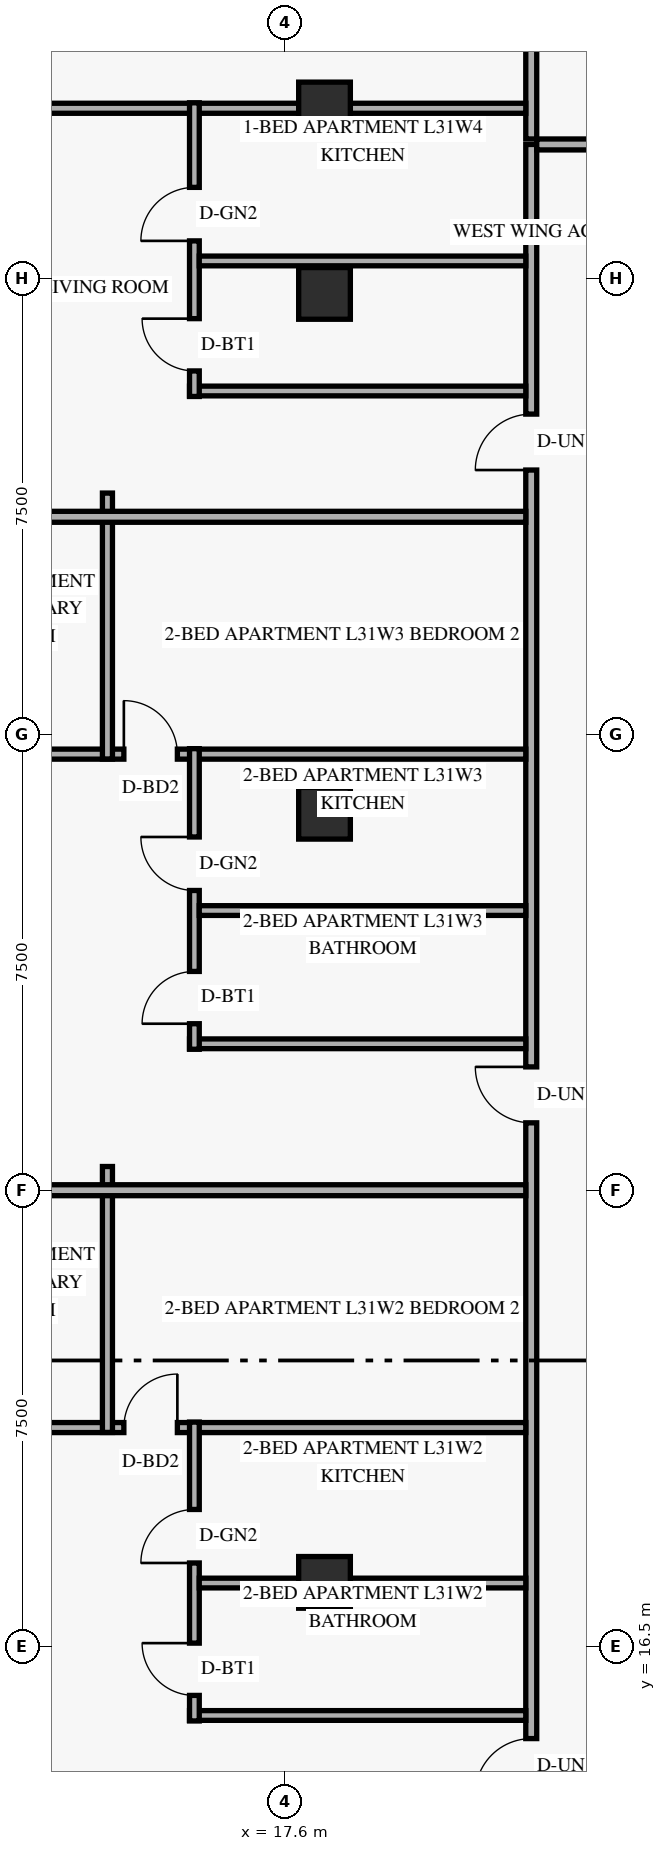
"""IFC4 building model, lengths in metres.
Left out: names, types, materials, properties, quantities, classifications, styles, units other than length and angle.
Written with IfcOpenShell. Run it as: python <this file> out.ifc"""

import sys

from ifc_helpers import new_model, si_unit, direction, frame, frame_2d, origin, origin_2d, place, context, subcontext, project, spatial, rectangle, extrude, element, fill, save


model = new_model("IFC4")
c1 = context("Model", 3, precision=1e-05, world=origin(), true_north=direction((0.0, 1.0)))
c2 = subcontext(c1, "Body", "Model", "MODEL_VIEW")
j1 = project(units=[si_unit("LENGTHUNIT", "METRE"), si_unit("PLANEANGLEUNIT", "RADIAN")], contexts=[c1])
p1 = place(None, origin())
s1 = spatial("IfcSite", under=j1, at=p1, CompositionType="ELEMENT")
p2 = place(p1, origin())
s2 = spatial("IfcBuilding", under=s1, at=p2, CompositionType="ELEMENT")
p3 = place(p2, frame((0.0, 0.0, 121.2)))
s3 = spatial("IfcBuildingStorey", under=s2, at=p3, CompositionType="ELEMENT", Elevation=121.2)
for number, where, z_axis, x_axis in (
    (1, (18.25, 17.55, 0.0), (0.0, 0.0, 1.0), (1.0, 0.0, 0.0)),
    (2, (18.25, 30.2, 0.0), (0.0, 0.0, 1.0), (1.0, 0.0, 0.0)),
    (3, (18.25, 38.75, 0.0), (0.0, 0.0, 1.0), (1.0, 0.0, 0.0)),
    (4, (18.25, 41.8, 0.0), (0.0, 0.0, 1.0), (1.0, 0.0, 0.0)),
):
    element("IfcColumn", number, at=place(p3, frame(where, z_axis=z_axis, x_axis=x_axis)), inside=s3, PredefinedType="COLUMN", context=c2, shape_type="SweptSolid", body=[
        extrude(rectangle(XDim=0.85, YDim=0.85, at=origin_2d()), origin(), (0.0, 0.0, 1.0), 3.6),
    ])
p4 = place(p3, frame((21.65, 6.8, 0.0), z_axis=(0.0, 0.0, 1.0), x_axis=(0.0, 1.0, 0.0)))
e5 = element("IfcWall", 5, at=p4, inside=s3, PredefinedType="STANDARD", context=c2, shape_type="SweptSolid", body=[
    extrude(rectangle(XDim=34.4, YDim=0.18, at=frame_2d((17.2, 0.0))), origin(), (0.0, 0.0, 1.0), 2.731),
])
p5 = place(p4, frame((4.472, 0.0, 0.0)))
e6 = element("IfcOpeningElement", 6, at=p5, cuts=e5, PredefinedType="OPENING", context=c2, shape_type="SweptSolid", body=[
    extrude(rectangle(XDim=0.92, YDim=2.15, at=frame_2d((0.46, 1.075))), frame((0.0, 0.1, 0.0), z_axis=(0.0, -1.0, 0.0), x_axis=(1.0, 0.0, 0.0)), (0.0, 0.0, 1.0), 0.2),
])
p6 = place(p4, frame((7.261, 0.0, 0.0)))
e7 = element("IfcOpeningElement", 7, at=p6, cuts=e5, PredefinedType="OPENING", context=c2, shape_type="SweptSolid", body=[
    extrude(rectangle(XDim=0.92, YDim=2.15, at=frame_2d((0.46, 1.075))), frame((0.0, 0.1, 0.0), z_axis=(0.0, -1.0, 0.0), x_axis=(1.0, 0.0, 0.0)), (0.0, 0.0, 1.0), 0.2),
])
p7 = place(p4, frame((18.308, 0.0, 0.0)))
e8 = element("IfcOpeningElement", 8, at=p7, cuts=e5, PredefinedType="OPENING", context=c2, shape_type="SweptSolid", body=[
    extrude(rectangle(XDim=0.92, YDim=2.15, at=frame_2d((0.46, 1.075))), frame((0.0, 0.1, 0.0), z_axis=(0.0, -1.0, 0.0), x_axis=(1.0, 0.0, 0.0)), (0.0, 0.0, 1.0), 0.2),
])
p8 = place(p4, frame((29.045, 0.0, 0.0)))
e9 = element("IfcOpeningElement", 9, at=p8, cuts=e5, PredefinedType="OPENING", context=c2, shape_type="SweptSolid", body=[
    extrude(rectangle(XDim=0.92, YDim=2.15, at=frame_2d((0.46, 1.075))), frame((0.0, 0.1, 0.0), z_axis=(0.0, -1.0, 0.0), x_axis=(1.0, 0.0, 0.0)), (0.0, 0.0, 1.0), 0.2),
])
p9 = place(p3, frame((21.74, 41.2, 0.0), z_axis=(0.0, 0.0, 1.0), x_axis=(1.0, 0.0, 0.0)))
e10 = element("IfcWall", 10, at=p9, inside=s3, PredefinedType="STANDARD", context=c2, shape_type="SweptSolid", body=[
    extrude(rectangle(XDim=13.68, YDim=0.18, at=frame_2d((6.84, 0.0))), origin(), (0.0, 0.0, 1.0), 2.731),
])
p10 = place(p9, frame((3.09, 0.0, 0.0)))
e11 = element("IfcOpeningElement", 11, at=p10, cuts=e10, PredefinedType="OPENING", context=c2, shape_type="SweptSolid", body=[
    extrude(rectangle(XDim=0.95, YDim=2.15, at=frame_2d((0.475, 1.075))), frame((0.0, 0.1, 0.0), z_axis=(0.0, -1.0, 0.0), x_axis=(1.0, 0.0, 0.0)), (0.0, 0.0, 1.0), 0.2),
])
p11 = place(p9, frame((10.11, 0.0, 0.0)))
e12 = element("IfcOpeningElement", 12, at=p11, cuts=e10, PredefinedType="OPENING", context=c2, shape_type="SweptSolid", body=[
    extrude(rectangle(XDim=0.95, YDim=2.15, at=frame_2d((0.475, 1.075))), frame((0.0, 0.1, 0.0), z_axis=(0.0, -1.0, 0.0), x_axis=(1.0, 0.0, 0.0)), (0.0, 0.0, 1.0), 0.2),
])
p12 = place(p3, frame((21.65, 41.29, 0.0), z_axis=(0.0, 0.0, 1.0), x_axis=(0.0, 1.0, 0.0)))
e13 = element("IfcWall", 13, at=p12, inside=s3, PredefinedType="PARTITIONING", context=c2, shape_type="SweptSolid", body=[
    extrude(rectangle(XDim=3.73, YDim=0.18, at=frame_2d((1.865, 0.0))), origin(), (0.0, 0.0, 1.0), 2.809),
])
p13 = place(p3, frame((10.08, 20.096, 0.0), z_axis=(0.0, 0.0, 1.0), x_axis=(1.0, 0.0, 0.0)))
e14 = element("IfcWall", 14, at=p13, inside=s3, PredefinedType="PARTITIONING", context=c2, shape_type="SweptSolid", body=[
    extrude(rectangle(XDim=11.48, YDim=0.165, at=frame_2d((5.74, 0.0))), origin(), (0.0, 0.0, 1.0), 2.731),
])
p14 = place(p13, frame((1.75, 0.0, 0.0)))
e15 = element("IfcOpeningElement", 15, at=p14, cuts=e14, PredefinedType="OPENING", context=c2, shape_type="SweptSolid", body=[
    extrude(rectangle(XDim=0.88, YDim=2.14, at=frame_2d((0.44, 1.07))), frame((0.0, 0.093, 0.0), z_axis=(0.0, -1.0, 0.0), x_axis=(1.0, 0.0, 0.0)), (0.0, 0.0, 1.0), 0.185),
])
p15 = place(p13, frame((4.87, 0.0, 0.0)))
e16 = element("IfcOpeningElement", 16, at=p15, cuts=e14, PredefinedType="OPENING", context=c2, shape_type="SweptSolid", body=[
    extrude(rectangle(XDim=0.88, YDim=2.14, at=frame_2d((0.44, 1.07))), frame((0.0, 0.093, 0.0), z_axis=(0.0, -1.0, 0.0), x_axis=(1.0, 0.0, 0.0)), (0.0, 0.0, 1.0), 0.185),
])
p16 = place(p3, frame((16.03, 15.361, 0.0), z_axis=(0.0, 0.0, 1.0), x_axis=(1.0, 0.0, 0.0)))
e17 = element("IfcWall", 17, at=p16, inside=s3, PredefinedType="PLUMBINGWALL", context=c2, shape_type="SweptSolid", body=[
    extrude(rectangle(XDim=5.53, YDim=0.16, at=frame_2d((2.765, 0.0))), origin(), (0.0, 0.0, 1.0), 2.731),
])
p17 = place(p3, frame((16.11, 15.271, 0.0), z_axis=(0.0, 0.0, 1.0), x_axis=(0.0, 1.0, 0.0)))
e18 = element("IfcWall", 18, at=p17, inside=s3, PredefinedType="PLUMBINGWALL", context=c2, shape_type="SweptSolid", body=[
    extrude(rectangle(XDim=4.915, YDim=0.16, at=frame_2d((2.458, 0.0))), origin(), (0.0, 0.0, 1.0), 2.731),
])
p18 = place(p17, frame((0.42, 0.0, 0.0)))
e19 = element("IfcOpeningElement", 19, at=p18, cuts=e18, PredefinedType="OPENING", context=c2, shape_type="SweptSolid", body=[
    extrude(rectangle(XDim=0.86, YDim=2.12, at=frame_2d((0.43, 1.06))), frame((0.0, 0.09, 0.0), z_axis=(0.0, -1.0, 0.0), x_axis=(1.0, 0.0, 0.0)), (0.0, 0.0, 1.0), 0.18),
])
p19 = place(p17, frame((2.598, 0.0, 0.0)))
e20 = element("IfcOpeningElement", 20, at=p19, cuts=e18, PredefinedType="OPENING", context=c2, shape_type="SweptSolid", body=[
    extrude(rectangle(XDim=0.88, YDim=2.12, at=frame_2d((0.44, 1.06))), frame((0.0, 0.09, 0.0), z_axis=(0.0, -1.0, 0.0), x_axis=(1.0, 0.0, 0.0)), (0.0, 0.0, 1.0), 0.18),
])
p20 = place(p3, frame((16.19, 17.539, 0.0), z_axis=(0.0, 0.0, 1.0), x_axis=(1.0, 0.0, 0.0)))
e21 = element("IfcWall", 21, at=p20, inside=s3, PredefinedType="PLUMBINGWALL", context=c2, shape_type="SweptSolid", body=[
    extrude(rectangle(XDim=5.37, YDim=0.16, at=frame_2d((2.685, 0.0))), origin(), (0.0, 0.0, 1.0), 2.731),
])
p21 = place(p3, frame((14.68, 20.016, 0.0), z_axis=(0.0, 0.0, 1.0), x_axis=(0.0, 1.0, 0.0)))
e22 = element("IfcWall", 22, at=p21, inside=s3, PredefinedType="PARTITIONING", context=c2, shape_type="SweptSolid", body=[
    extrude(rectangle(XDim=4.374, YDim=0.165, at=frame_2d((2.187, 0.0))), origin(), (0.0, 0.0, 1.0), 3.36),
])
p22 = place(p3, frame((10.08, 24.0, 0.0), z_axis=(0.0, 0.0, 1.0), x_axis=(1.0, 0.0, 0.0)))
e23 = element("IfcWall", 23, at=p22, inside=s3, PredefinedType="PARTITIONING", context=c2, shape_type="SweptSolid", body=[
    extrude(rectangle(XDim=11.48, YDim=0.18, at=frame_2d((5.74, 0.0))), origin(), (0.0, 0.0, 1.0), 2.731),
])
p23 = place(p3, frame((10.08, 31.172, 0.0), z_axis=(0.0, 0.0, 1.0), x_axis=(1.0, 0.0, 0.0)))
e24 = element("IfcWall", 24, at=p23, inside=s3, PredefinedType="PARTITIONING", context=c2, shape_type="SweptSolid", body=[
    extrude(rectangle(XDim=11.48, YDim=0.165, at=frame_2d((5.74, 0.0))), origin(), (0.0, 0.0, 1.0), 2.731),
])
p24 = place(p23, frame((1.75, 0.0, 0.0)))
e25 = element("IfcOpeningElement", 25, at=p24, cuts=e24, PredefinedType="OPENING", context=c2, shape_type="SweptSolid", body=[
    extrude(rectangle(XDim=0.88, YDim=2.14, at=frame_2d((0.44, 1.07))), frame((0.0, 0.093, 0.0), z_axis=(0.0, -1.0, 0.0), x_axis=(1.0, 0.0, 0.0)), (0.0, 0.0, 1.0), 0.185),
])
p25 = place(p23, frame((4.87, 0.0, 0.0)))
e26 = element("IfcOpeningElement", 26, at=p25, cuts=e24, PredefinedType="OPENING", context=c2, shape_type="SweptSolid", body=[
    extrude(rectangle(XDim=0.88, YDim=2.14, at=frame_2d((0.44, 1.07))), frame((0.0, 0.093, 0.0), z_axis=(0.0, -1.0, 0.0), x_axis=(1.0, 0.0, 0.0)), (0.0, 0.0, 1.0), 0.185),
])
p26 = place(p3, frame((16.03, 26.408, 0.0), z_axis=(0.0, 0.0, 1.0), x_axis=(1.0, 0.0, 0.0)))
e27 = element("IfcWall", 27, at=p26, inside=s3, PredefinedType="PLUMBINGWALL", context=c2, shape_type="SweptSolid", body=[
    extrude(rectangle(XDim=5.53, YDim=0.16, at=frame_2d((2.765, 0.0))), origin(), (0.0, 0.0, 1.0), 2.731),
])
p27 = place(p3, frame((16.11, 26.318, 0.0), z_axis=(0.0, 0.0, 1.0), x_axis=(0.0, 1.0, 0.0)))
e28 = element("IfcWall", 28, at=p27, inside=s3, PredefinedType="PLUMBINGWALL", context=c2, shape_type="SweptSolid", body=[
    extrude(rectangle(XDim=4.944, YDim=0.16, at=frame_2d((2.472, 0.0))), origin(), (0.0, 0.0, 1.0), 2.731),
])
p28 = place(p27, frame((0.42, 0.0, 0.0)))
e29 = element("IfcOpeningElement", 29, at=p28, cuts=e28, PredefinedType="OPENING", context=c2, shape_type="SweptSolid", body=[
    extrude(rectangle(XDim=0.86, YDim=2.12, at=frame_2d((0.43, 1.06))), frame((0.0, 0.09, 0.0), z_axis=(0.0, -1.0, 0.0), x_axis=(1.0, 0.0, 0.0)), (0.0, 0.0, 1.0), 0.18),
])
p29 = place(p27, frame((2.611, 0.0, 0.0)))
e30 = element("IfcOpeningElement", 30, at=p29, cuts=e28, PredefinedType="OPENING", context=c2, shape_type="SweptSolid", body=[
    extrude(rectangle(XDim=0.88, YDim=2.12, at=frame_2d((0.44, 1.06))), frame((0.0, 0.09, 0.0), z_axis=(0.0, -1.0, 0.0), x_axis=(1.0, 0.0, 0.0)), (0.0, 0.0, 1.0), 0.18),
])
p30 = place(p3, frame((16.19, 28.6, 0.0), z_axis=(0.0, 0.0, 1.0), x_axis=(1.0, 0.0, 0.0)))
e31 = element("IfcWall", 31, at=p30, inside=s3, PredefinedType="PLUMBINGWALL", context=c2, shape_type="SweptSolid", body=[
    extrude(rectangle(XDim=5.37, YDim=0.16, at=frame_2d((2.685, 0.0))), origin(), (0.0, 0.0, 1.0), 2.731),
])
p31 = place(p3, frame((14.68, 31.092, 0.0), z_axis=(0.0, 0.0, 1.0), x_axis=(0.0, 1.0, 0.0)))
e32 = element("IfcWall", 32, at=p31, inside=s3, PredefinedType="PARTITIONING", context=c2, shape_type="SweptSolid", body=[
    extrude(rectangle(XDim=4.374, YDim=0.165, at=frame_2d((2.187, 0.0))), origin(), (0.0, 0.0, 1.0), 2.988),
])
p32 = place(p3, frame((10.08, 35.076, 0.0), z_axis=(0.0, 0.0, 1.0), x_axis=(1.0, 0.0, 0.0)))
e33 = element("IfcWall", 33, at=p32, inside=s3, PredefinedType="PARTITIONING", context=c2, shape_type="SweptSolid", body=[
    extrude(rectangle(XDim=11.48, YDim=0.18, at=frame_2d((5.74, 0.0))), origin(), (0.0, 0.0, 1.0), 2.731),
])
p33 = place(p3, frame((10.099, 41.795, 0.0), z_axis=(0.0, 0.0, 1.0), x_axis=(1.0, 0.0, 0.0)))
e34 = element("IfcWall", 34, at=p33, inside=s3, PredefinedType="PARTITIONING", context=c2, shape_type="SweptSolid", body=[
    extrude(rectangle(XDim=11.461, YDim=0.165, at=frame_2d((5.73, 0.0))), origin(), (0.0, 0.0, 1.0), 2.809),
])
p34 = place(p33, frame((2.391, 0.0, 0.0)))
e35 = element("IfcOpeningElement", 35, at=p34, cuts=e34, PredefinedType="OPENING", context=c2, shape_type="SweptSolid", body=[
    extrude(rectangle(XDim=0.9, YDim=2.14, at=frame_2d((0.45, 1.07))), frame((0.0, 0.093, 0.0), z_axis=(0.0, -1.0, 0.0), x_axis=(1.0, 0.0, 0.0)), (0.0, 0.0, 1.0), 0.185),
])
p35 = place(p3, frame((16.03, 37.145, 0.0), z_axis=(0.0, 0.0, 1.0), x_axis=(1.0, 0.0, 0.0)))
e36 = element("IfcWall", 36, at=p35, inside=s3, PredefinedType="PLUMBINGWALL", context=c2, shape_type="SweptSolid", body=[
    extrude(rectangle(XDim=5.53, YDim=0.16, at=frame_2d((2.765, 0.0))), origin(), (0.0, 0.0, 1.0), 2.731),
])
p36 = place(p3, frame((16.11, 37.055, 0.0), z_axis=(0.0, 0.0, 1.0), x_axis=(0.0, 1.0, 0.0)))
e37 = element("IfcWall", 37, at=p36, inside=s3, PredefinedType="PLUMBINGWALL", context=c2, shape_type="SweptSolid", body=[
    extrude(rectangle(XDim=4.83, YDim=0.16, at=frame_2d((2.415, 0.0))), origin(), (0.0, 0.0, 1.0), 2.731),
])
p37 = place(p36, frame((0.42, 0.0, 0.0)))
e38 = element("IfcOpeningElement", 38, at=p37, cuts=e37, PredefinedType="OPENING", context=c2, shape_type="SweptSolid", body=[
    extrude(rectangle(XDim=0.86, YDim=2.12, at=frame_2d((0.43, 1.06))), frame((0.0, 0.09, 0.0), z_axis=(0.0, -1.0, 0.0), x_axis=(1.0, 0.0, 0.0)), (0.0, 0.0, 1.0), 0.18),
])
p38 = place(p36, frame((2.559, 0.0, 0.0)))
e39 = element("IfcOpeningElement", 39, at=p38, cuts=e37, PredefinedType="OPENING", context=c2, shape_type="SweptSolid", body=[
    extrude(rectangle(XDim=0.88, YDim=2.12, at=frame_2d((0.44, 1.06))), frame((0.0, 0.09, 0.0), z_axis=(0.0, -1.0, 0.0), x_axis=(1.0, 0.0, 0.0)), (0.0, 0.0, 1.0), 0.18),
])
p39 = place(p3, frame((16.19, 39.284, 0.0), z_axis=(0.0, 0.0, 1.0), x_axis=(1.0, 0.0, 0.0)))
e40 = element("IfcWall", 40, at=p39, inside=s3, PredefinedType="PLUMBINGWALL", context=c2, shape_type="SweptSolid", body=[
    extrude(rectangle(XDim=5.37, YDim=0.16, at=frame_2d((2.685, 0.0))), origin(), (0.0, 0.0, 1.0), 2.731),
])
p40 = place(p6, origin())
e41 = element("IfcDoor", 41, at=p40, inside=s3, OperationType="SINGLE_SWING_LEFT", PredefinedType="DOOR", context=c2, shape_type="SweptSolid", body=[
    extrude(rectangle(XDim=0.92, YDim=2.15, at=frame_2d((0.46, 1.075))), frame((0.0, 0.025, 0.0), z_axis=(0.0, -1.0, 0.0), x_axis=(1.0, 0.0, 0.0)), (0.0, 0.0, 1.0), 0.05),
])
fill(e7, e41)
p41 = place(p18, origin())
e42 = element("IfcDoor", 42, at=p41, inside=s3, OperationType="SINGLE_SWING_RIGHT", PredefinedType="DOOR", context=c2, shape_type="SweptSolid", body=[
    extrude(rectangle(XDim=0.86, YDim=2.12, at=frame_2d((0.43, 1.06))), frame((0.0, 0.025, 0.0), z_axis=(0.0, -1.0, 0.0), x_axis=(1.0, 0.0, 0.0)), (0.0, 0.0, 1.0), 0.05),
])
fill(e19, e42)
p42 = place(p19, origin())
e43 = element("IfcDoor", 43, at=p42, inside=s3, OperationType="SINGLE_SWING_LEFT", PredefinedType="DOOR", context=c2, shape_type="SweptSolid", body=[
    extrude(rectangle(XDim=0.88, YDim=2.12, at=frame_2d((0.44, 1.06))), frame((0.0, 0.025, 0.0), z_axis=(0.0, -1.0, 0.0), x_axis=(1.0, 0.0, 0.0)), (0.0, 0.0, 1.0), 0.05),
])
fill(e20, e43)
p43 = place(p15, origin())
e44 = element("IfcDoor", 44, at=p43, inside=s3, OperationType="SINGLE_SWING_RIGHT", PredefinedType="DOOR", context=c2, shape_type="SweptSolid", body=[
    extrude(rectangle(XDim=0.88, YDim=2.14, at=frame_2d((0.44, 1.07))), frame((0.0, 0.025, 0.0), z_axis=(0.0, -1.0, 0.0), x_axis=(1.0, 0.0, 0.0)), (0.0, 0.0, 1.0), 0.05),
])
fill(e16, e44)
p44 = place(p7, origin())
e45 = element("IfcDoor", 45, at=p44, inside=s3, OperationType="SINGLE_SWING_RIGHT", PredefinedType="DOOR", context=c2, shape_type="SweptSolid", body=[
    extrude(rectangle(XDim=0.92, YDim=2.15, at=frame_2d((0.46, 1.075))), frame((0.0, 0.025, 0.0), z_axis=(0.0, -1.0, 0.0), x_axis=(1.0, 0.0, 0.0)), (0.0, 0.0, 1.0), 0.05),
])
fill(e8, e45)
p45 = place(p28, origin())
e46 = element("IfcDoor", 46, at=p45, inside=s3, OperationType="SINGLE_SWING_LEFT", PredefinedType="DOOR", context=c2, shape_type="SweptSolid", body=[
    extrude(rectangle(XDim=0.86, YDim=2.12, at=frame_2d((0.43, 1.06))), frame((0.0, 0.025, 0.0), z_axis=(0.0, -1.0, 0.0), x_axis=(1.0, 0.0, 0.0)), (0.0, 0.0, 1.0), 0.05),
])
fill(e29, e46)
p46 = place(p29, origin())
e47 = element("IfcDoor", 47, at=p46, inside=s3, OperationType="SINGLE_SWING_RIGHT", PredefinedType="DOOR", context=c2, shape_type="SweptSolid", body=[
    extrude(rectangle(XDim=0.88, YDim=2.12, at=frame_2d((0.44, 1.06))), frame((0.0, 0.025, 0.0), z_axis=(0.0, -1.0, 0.0), x_axis=(1.0, 0.0, 0.0)), (0.0, 0.0, 1.0), 0.05),
])
fill(e30, e47)
p47 = place(p25, origin())
e48 = element("IfcDoor", 48, at=p47, inside=s3, OperationType="SINGLE_SWING_LEFT", PredefinedType="DOOR", context=c2, shape_type="SweptSolid", body=[
    extrude(rectangle(XDim=0.88, YDim=2.14, at=frame_2d((0.44, 1.07))), frame((0.0, 0.025, 0.0), z_axis=(0.0, -1.0, 0.0), x_axis=(1.0, 0.0, 0.0)), (0.0, 0.0, 1.0), 0.05),
])
fill(e26, e48)
p48 = place(p8, origin())
e49 = element("IfcDoor", 49, at=p48, inside=s3, OperationType="SINGLE_SWING_LEFT", PredefinedType="DOOR", context=c2, shape_type="SweptSolid", body=[
    extrude(rectangle(XDim=0.92, YDim=2.15, at=frame_2d((0.46, 1.075))), frame((0.0, 0.025, 0.0), z_axis=(0.0, -1.0, 0.0), x_axis=(1.0, 0.0, 0.0)), (0.0, 0.0, 1.0), 0.05),
])
fill(e9, e49)
p49 = place(p37, origin())
e50 = element("IfcDoor", 50, at=p49, inside=s3, OperationType="SINGLE_SWING_RIGHT", PredefinedType="DOOR", context=c2, shape_type="SweptSolid", body=[
    extrude(rectangle(XDim=0.86, YDim=2.12, at=frame_2d((0.43, 1.06))), frame((0.0, 0.025, 0.0), z_axis=(0.0, -1.0, 0.0), x_axis=(1.0, 0.0, 0.0)), (0.0, 0.0, 1.0), 0.05),
])
fill(e38, e50)
p50 = place(p38, origin())
e51 = element("IfcDoor", 51, at=p50, inside=s3, OperationType="SINGLE_SWING_LEFT", PredefinedType="DOOR", context=c2, shape_type="SweptSolid", body=[
    extrude(rectangle(XDim=0.88, YDim=2.12, at=frame_2d((0.44, 1.06))), frame((0.0, 0.025, 0.0), z_axis=(0.0, -1.0, 0.0), x_axis=(1.0, 0.0, 0.0)), (0.0, 0.0, 1.0), 0.05),
])
fill(e39, e51)
save(model, sys.argv[1])
